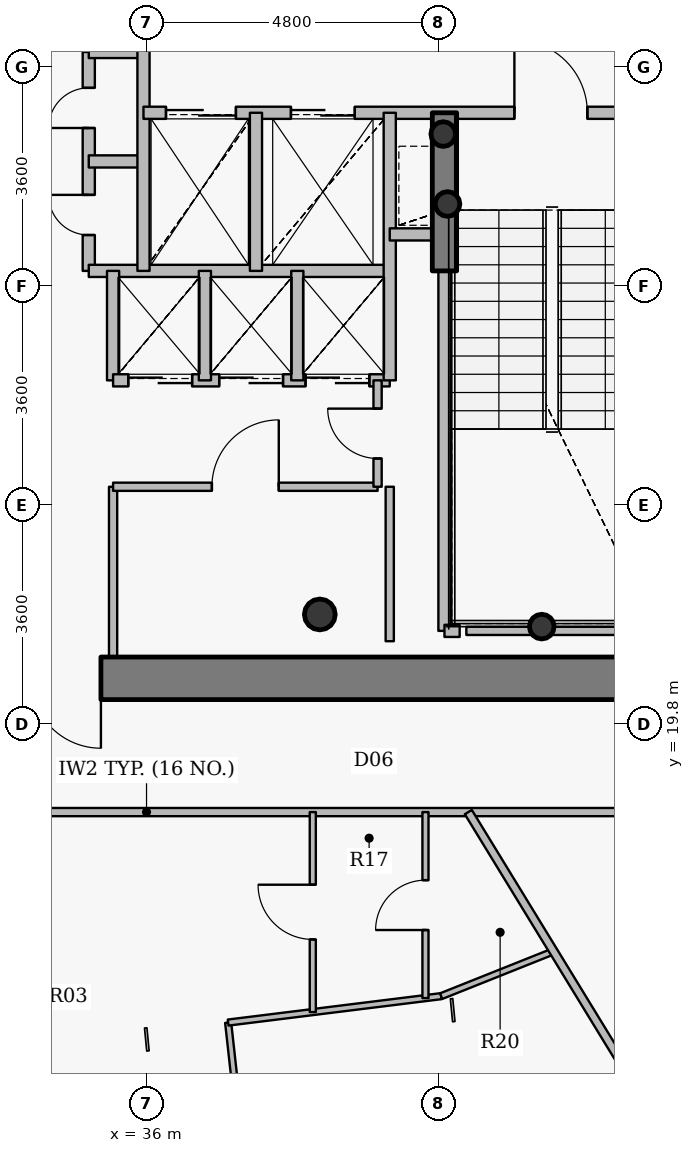
"""IFC4 building model, lengths in metres.
Left out: names, types, materials, properties, quantities, classifications, styles, units other than length and angle.
Written with IfcOpenShell. Run it as: python <this file> out.ifc"""

import sys

from ifc_helpers import new_model, si_unit, direction, frame, frame_2d, origin, origin_2d, place, context, subcontext, project, spatial, rectangle, hollow_circle, extrude, source, transform, mapped, element, fill, save


model = new_model("IFC4")
c1 = context("Model", 3, precision=1e-05, world=origin(), true_north=direction((0.0, 1.0)))
c2 = subcontext(c1, "Body", "Model", "MODEL_VIEW")
j1 = project(units=[si_unit("LENGTHUNIT", "METRE"), si_unit("PLANEANGLEUNIT", "RADIAN")], contexts=[c1])
p1 = place(None, origin())
s1 = spatial("IfcSite", under=j1, at=p1, CompositionType="ELEMENT")
p2 = place(p1, origin())
s2 = spatial("IfcBuilding", under=s1, at=p2, CompositionType="ELEMENT")
p3 = place(p2, frame((0.0, 0.0, 291.75)))
s3 = spatial("IfcBuildingStorey", under=s2, at=p3, CompositionType="ELEMENT", Elevation=291.75)
p4 = place(p3, frame((38.85, 21.6, 0.0), z_axis=(0.0, 0.0, 1.0), x_axis=(1.0, 0.0, 0.0)))
e1 = element("IfcColumn", 1, at=p4, inside=s3, PredefinedType="COLUMN", context=c2, shape_type="SweptSolid", body=[
    extrude(hollow_circle(Radius=0.254, WallThickness=0.02, at=origin_2d()), origin(), (0.0, 0.0, 1.0), 3.75),
])
for number, where, z_axis, x_axis in (
    (2, (42.5, 21.4, 0.0), (0.0, 0.0, 1.0), (1.0, 0.0, 0.0)),
    (3, (40.95, 28.35, 0.0), (0.0, 0.0, 1.0), (1.0, 0.0, 0.0)),
    (4, (40.88, 29.5, 0.0), (0.0, 0.0, 1.0), (1.0, 0.0, 0.0)),
):
    element("IfcColumn", number, at=place(p3, frame(where, z_axis=z_axis, x_axis=x_axis)), inside=s3, PredefinedType="COLUMN", context=c2, shape_type="SweptSolid", body=[
        extrude(hollow_circle(Radius=0.203, WallThickness=0.016, at=origin_2d()), origin(), (0.0, 0.0, 1.0), 3.75),
    ])
p5 = place(p3, frame((44.35, 20.55, 0.0), z_axis=(0.0, 0.0, 1.0), x_axis=(-1.0, 0.0, 0.0)))
e5 = element("IfcWall", 5, at=p5, inside=s3, PredefinedType="SHEAR", context=c2, shape_type="SweptSolid", body=[
    extrude(rectangle(XDim=16.7, YDim=0.7, at=frame_2d((8.35, 0.0))), origin(), (0.0, 0.0, 1.0), 3.05),
])
p6 = place(p5, frame((12.925, 0.0, 0.0)))
e6 = element("IfcOpeningElement", 6, at=p6, cuts=e5, PredefinedType="OPENING", context=c2, shape_type="SweptSolid", body=[
    extrude(rectangle(XDim=1.15, YDim=2.15, at=origin_2d()), frame((0.575, 0.36, 1.075), z_axis=(0.0, -1.0, 0.0), x_axis=(1.0, 0.0, 0.0)), (0.0, 0.0, 1.0), 0.72),
])
p7 = place(p5, frame((9.1, 0.0, 0.0)))
e7 = element("IfcOpeningElement", 7, at=p7, cuts=e5, PredefinedType="OPENING", context=c2, shape_type="SweptSolid", body=[
    extrude(rectangle(XDim=1.15, YDim=2.15, at=origin_2d()), frame((0.575, 0.36, 1.075), z_axis=(0.0, -1.0, 0.0), x_axis=(1.0, 0.0, 0.0)), (0.0, 0.0, 1.0), 0.72),
])
p8 = place(p3, frame((40.9, 27.25, 0.0), z_axis=(0.0, 0.0, 1.0), x_axis=(0.0, 1.0, 0.0)))
e8 = element("IfcWall", 8, at=p8, inside=s3, PredefinedType="SHEAR", context=c2, shape_type="SweptSolid", body=[
    extrude(rectangle(XDim=2.6, YDim=0.4, at=frame_2d((1.3, 0.0))), origin(), (0.0, 0.0, 1.0), 3.1),
])
p9 = place(p3, frame((24.95, 18.35, 0.0), z_axis=(0.0, 0.0, 1.0), x_axis=(1.0, 0.0, 0.0)))
e9 = element("IfcWall", 9, at=p9, inside=s3, PredefinedType="PARTITIONING", context=c2, shape_type="SweptSolid", body=[
    extrude(rectangle(XDim=22.1, YDim=0.135, at=frame_2d((11.05, 0.0))), origin(), (0.0, 0.0, 1.0), 3.035),
])
p10 = place(p9, frame((6.49, 0.0, 0.0)))
e10 = element("IfcOpeningElement", 10, at=p10, cuts=e9, PredefinedType="OPENING", context=c2, shape_type="SweptSolid", body=[
    extrude(rectangle(XDim=1.0, YDim=2.15, at=origin_2d()), frame((0.5, 0.078, 1.075), z_axis=(0.0, -1.0, 0.0), x_axis=(1.0, 0.0, 0.0)), (0.0, 0.0, 1.0), 0.155),
])
p11 = place(p3, frame((35.05, 27.25, 0.0), z_axis=(0.0, 0.0, 1.0), x_axis=(0.0, 1.0, 0.0)))
e11 = element("IfcWall", 11, at=p11, inside=s3, PredefinedType="PARTITIONING", context=c2, shape_type="SweptSolid", body=[
    extrude(rectangle(XDim=3.6, YDim=0.2, at=frame_2d((1.8, 0.0))), origin(), (0.0, 0.0, 1.0), 3.5),
])
p12 = place(p11, frame((0.59, 0.0, 0.0)))
e12 = element("IfcOpeningElement", 12, at=p12, cuts=e11, PredefinedType="OPENING", context=c2, shape_type="SweptSolid", body=[
    extrude(rectangle(XDim=0.66, YDim=2.05, at=origin_2d()), frame((0.33, 0.11, 1.025), z_axis=(0.0, -1.0, 0.0), x_axis=(1.0, 0.0, 0.0)), (0.0, 0.0, 1.0), 0.22),
])
p13 = place(p11, frame((2.35, 0.0, 0.0)))
e13 = element("IfcOpeningElement", 13, at=p13, cuts=e11, PredefinedType="OPENING", context=c2, shape_type="SweptSolid", body=[
    extrude(rectangle(XDim=0.66, YDim=2.05, at=origin_2d()), frame((0.33, 0.11, 1.025), z_axis=(0.0, -1.0, 0.0), x_axis=(1.0, 0.0, 0.0)), (0.0, 0.0, 1.0), 0.22),
])
p14 = place(p3, frame((35.05, 27.25, 0.0), z_axis=(0.0, 0.0, 1.0), x_axis=(1.0, 0.0, 0.0)))
e14 = element("IfcWall", 14, at=p14, inside=s3, PredefinedType="PARTITIONING", context=c2, shape_type="SweptSolid", body=[
    extrude(rectangle(XDim=4.95, YDim=0.2, at=frame_2d((2.475, 0.0))), origin(), (0.0, 0.0, 1.0), 3.085),
])
for number, where, z_axis, x_axis in (
    (15, (35.05, 29.05, 0.0), (0.0, 0.0, 1.0), (1.0, 0.0, 0.0)),
    (16, (35.05, 30.85, 0.0), (0.0, 0.0, 1.0), (1.0, 0.0, 0.0)),
):
    element("IfcWall", number, at=place(p3, frame(where, z_axis=z_axis, x_axis=x_axis)), inside=s3, PredefinedType="PARTITIONING", context=c2, shape_type="SweptSolid", body=[
        extrude(rectangle(XDim=0.9, YDim=0.2, at=frame_2d((0.45, 0.0))), origin(), (0.0, 0.0, 1.0), 3.5),
    ])
p15 = place(p3, frame((35.45, 20.9, 0.0), z_axis=(0.0, 0.0, 1.0), x_axis=(0.0, 1.0, 0.0)))
e17 = element("IfcWall", 17, at=p15, inside=s3, PredefinedType="PARTITIONING", context=c2, shape_type="SweptSolid", body=[
    extrude(rectangle(XDim=2.8, YDim=0.135, at=frame_2d((1.4, 0.0))), origin(), (0.0, 0.0, 1.0), 3.085),
])
p16 = place(p3, frame((35.45, 23.7, 0.0), z_axis=(0.0, 0.0, 1.0), x_axis=(1.0, 0.0, 0.0)))
e18 = element("IfcWall", 18, at=p16, inside=s3, PredefinedType="PARTITIONING", context=c2, shape_type="SweptSolid", body=[
    extrude(rectangle(XDim=4.35, YDim=0.135, at=frame_2d((2.175, 0.0))), origin(), (0.0, 0.0, 1.0), 3.085),
])
p17 = place(p16, frame((1.625, 0.0, 0.0)))
e19 = element("IfcOpeningElement", 19, at=p17, cuts=e18, PredefinedType="OPENING", context=c2, shape_type="SweptSolid", body=[
    extrude(rectangle(XDim=1.1, YDim=2.15, at=origin_2d()), frame((0.55, 0.078, 1.075), z_axis=(0.0, -1.0, 0.0), x_axis=(1.0, 0.0, 0.0)), (0.0, 0.0, 1.0), 0.155),
])
p18 = place(p3, frame((35.45, 25.45, 0.0), z_axis=(0.0, 0.0, 1.0), x_axis=(0.0, 1.0, 0.0)))
e20 = element("IfcWall", 20, at=p18, inside=s3, PredefinedType="PARTITIONING", context=c2, shape_type="SweptSolid", body=[
    extrude(rectangle(XDim=1.8, YDim=0.2, at=frame_2d((0.9, 0.0))), origin(), (0.0, 0.0, 1.0), 3.5),
])
p19 = place(p3, frame((35.45, 25.45, 0.0), z_axis=(0.0, 0.0, 1.0), x_axis=(1.0, 0.0, 0.0)))
e21 = element("IfcWall", 21, at=p19, inside=s3, PredefinedType="PARTITIONING", context=c2, shape_type="SweptSolid", body=[
    extrude(rectangle(XDim=4.55, YDim=0.2, at=frame_2d((2.275, 0.0))), origin(), (0.0, 0.0, 1.0), 3.085),
])
p20 = place(p19, frame((0.25, 0.0, 0.0)))
e22 = element("IfcOpeningElement", 22, at=p20, cuts=e21, PredefinedType="OPENING", context=c2, shape_type="SweptSolid", body=[
    extrude(rectangle(XDim=1.05, YDim=2.15, at=origin_2d()), frame((0.525, 0.11, 1.075), z_axis=(0.0, -1.0, 0.0), x_axis=(1.0, 0.0, 0.0)), (0.0, 0.0, 1.0), 0.22),
])
p21 = place(p19, frame((1.745, 0.0, 0.0)))
e23 = element("IfcOpeningElement", 23, at=p21, cuts=e21, PredefinedType="OPENING", context=c2, shape_type="SweptSolid", body=[
    extrude(rectangle(XDim=1.05, YDim=2.15, at=origin_2d()), frame((0.525, 0.11, 1.075), z_axis=(0.0, -1.0, 0.0), x_axis=(1.0, 0.0, 0.0)), (0.0, 0.0, 1.0), 0.22),
])
p22 = place(p19, frame((3.165, 0.0, 0.0)))
e24 = element("IfcOpeningElement", 24, at=p22, cuts=e21, PredefinedType="OPENING", context=c2, shape_type="SweptSolid", body=[
    extrude(rectangle(XDim=1.05, YDim=2.15, at=origin_2d()), frame((0.525, 0.11, 1.075), z_axis=(0.0, -1.0, 0.0), x_axis=(1.0, 0.0, 0.0)), (0.0, 0.0, 1.0), 0.22),
])
p23 = place(p3, frame((35.95, 27.25, 0.0), z_axis=(0.0, 0.0, 1.0), x_axis=(0.0, 1.0, 0.0)))
e25 = element("IfcWall", 25, at=p23, inside=s3, PredefinedType="PARTITIONING", context=c2, shape_type="SweptSolid", body=[
    extrude(rectangle(XDim=3.8, YDim=0.2, at=frame_2d((1.9, 0.0))), origin(), (0.0, 0.0, 1.0), 3.5),
])
p24 = place(p3, frame((35.95, 29.85, 0.0), z_axis=(0.0, 0.0, 1.0), x_axis=(1.0, 0.0, 0.0)))
e26 = element("IfcWall", 26, at=p24, inside=s3, PredefinedType="PARTITIONING", context=c2, shape_type="SweptSolid", body=[
    extrude(rectangle(XDim=8.49, YDim=0.2, at=frame_2d((4.245, 0.0))), origin(), (0.0, 0.0, 1.0), 3.085),
])
p25 = place(p24, frame((6.1, 0.0, 0.0)))
e27 = element("IfcOpeningElement", 27, at=p25, cuts=e26, PredefinedType="OPENING", context=c2, shape_type="SweptSolid", body=[
    extrude(rectangle(XDim=1.2, YDim=2.15, at=origin_2d()), frame((0.6, 0.11, 1.075), z_axis=(0.0, -1.0, 0.0), x_axis=(1.0, 0.0, 0.0)), (0.0, 0.0, 1.0), 0.22),
])
p26 = place(p24, frame((0.37, 0.0, 0.0)))
e28 = element("IfcOpeningElement", 28, at=p26, cuts=e26, PredefinedType="OPENING", context=c2, shape_type="SweptSolid", body=[
    extrude(rectangle(XDim=1.15, YDim=2.15, at=origin_2d()), frame((0.575, 0.11, 1.075), z_axis=(0.0, -1.0, 0.0), x_axis=(1.0, 0.0, 0.0)), (0.0, 0.0, 1.0), 0.22),
])
p27 = place(p24, frame((2.425, 0.0, 0.0)))
e29 = element("IfcOpeningElement", 29, at=p27, cuts=e26, PredefinedType="OPENING", context=c2, shape_type="SweptSolid", body=[
    extrude(rectangle(XDim=1.05, YDim=2.15, at=origin_2d()), frame((0.525, 0.11, 1.075), z_axis=(0.0, -1.0, 0.0), x_axis=(1.0, 0.0, 0.0)), (0.0, 0.0, 1.0), 0.22),
])
p28 = place(p3, frame((36.96, 25.45, 0.0), z_axis=(0.0, 0.0, 1.0), x_axis=(0.0, 1.0, 0.0)))
e30 = element("IfcWall", 30, at=p28, inside=s3, PredefinedType="PARTITIONING", context=c2, shape_type="SweptSolid", body=[
    extrude(rectangle(XDim=1.8, YDim=0.2, at=frame_2d((0.9, 0.0))), origin(), (0.0, 0.0, 1.0), 3.5),
])
p29 = place(p3, frame((37.342, 14.888, 0.0), z_axis=(0.0, 0.0, 1.0), x_axis=(0.110149295127, -0.993915053102, 0.0)))
e31 = element("IfcWall", 31, at=p29, inside=s3, PredefinedType="PARTITIONING", context=c2, shape_type="SweptSolid", body=[
    extrude(rectangle(XDim=5.222, YDim=0.1, at=frame_2d((2.611, 0.0))), origin(), (0.0, 0.0, 1.0), 2.985),
])
p30 = place(p29, frame((2.161, 0.0, 0.0)))
e32 = element("IfcOpeningElement", 32, at=p30, cuts=e31, PredefinedType="OPENING", context=c2, shape_type="SweptSolid", body=[
    extrude(rectangle(XDim=0.9, YDim=2.1, at=origin_2d()), frame((0.45, 0.06, 1.05), z_axis=(0.0, -1.0, 0.0), x_axis=(1.0, 0.0, 0.0)), (0.0, 0.0, 1.0), 0.12),
])
p31 = place(p3, frame((37.342, 14.888, 0.0), z_axis=(0.0, 0.0, 1.0), x_axis=(0.992393420873, 0.123106856865, 0.0)))
e33 = element("IfcWall", 33, at=p31, inside=s3, PredefinedType="PARTITIONING", context=c2, shape_type="SweptSolid", body=[
    extrude(rectangle(XDim=3.53, YDim=0.1, at=frame_2d((1.765, 0.0))), origin(), (0.0, 0.0, 1.0), 3.035),
])
p32 = place(p3, frame((37.8, 27.25, 0.0), z_axis=(0.0, 0.0, 1.0), x_axis=(0.0, 1.0, 0.0)))
e34 = element("IfcWall", 34, at=p32, inside=s3, PredefinedType="PARTITIONING", context=c2, shape_type="SweptSolid", body=[
    extrude(rectangle(XDim=2.6, YDim=0.2, at=frame_2d((1.3, 0.0))), origin(), (0.0, 0.0, 1.0), 3.5),
])
p33 = place(p3, frame((38.48, 25.45, 0.0), z_axis=(0.0, 0.0, 1.0), x_axis=(0.0, 1.0, 0.0)))
e35 = element("IfcWall", 35, at=p33, inside=s3, PredefinedType="PARTITIONING", context=c2, shape_type="SweptSolid", body=[
    extrude(rectangle(XDim=1.8, YDim=0.2, at=frame_2d((0.9, 0.0))), origin(), (0.0, 0.0, 1.0), 3.5),
])
p34 = place(p3, frame((38.734, 15.061, 0.0), z_axis=(0.0, 0.0, 1.0), x_axis=(0.0, 1.0, 0.0)))
e36 = element("IfcWall", 36, at=p34, inside=s3, PredefinedType="PARTITIONING", context=c2, shape_type="SweptSolid", body=[
    extrude(rectangle(XDim=3.289, YDim=0.1, at=frame_2d((1.645, 0.0))), origin(), (0.0, 0.0, 1.0), 3.5),
])
p35 = place(p34, frame((1.194, 0.0, 0.0)))
e37 = element("IfcOpeningElement", 37, at=p35, cuts=e36, PredefinedType="OPENING", context=c2, shape_type="SweptSolid", body=[
    extrude(rectangle(XDim=0.9, YDim=2.1, at=origin_2d()), frame((0.45, 0.06, 1.05), z_axis=(0.0, -1.0, 0.0), x_axis=(1.0, 0.0, 0.0)), (0.0, 0.0, 1.0), 0.12),
])
p36 = place(p3, frame((39.8, 23.7, 0.0), z_axis=(0.0, 0.0, 1.0), x_axis=(0.0, 1.0, 0.0)))
e38 = element("IfcWall", 38, at=p36, inside=s3, PredefinedType="PARTITIONING", context=c2, shape_type="SweptSolid", body=[
    extrude(rectangle(XDim=1.75, YDim=0.135, at=frame_2d((0.875, 0.0))), origin(), (0.0, 0.0, 1.0), 3.5),
])
p37 = place(p36, frame((0.465, 0.0, 0.0)))
e39 = element("IfcOpeningElement", 39, at=p37, cuts=e38, PredefinedType="OPENING", context=c2, shape_type="SweptSolid", body=[
    extrude(rectangle(XDim=0.82, YDim=2.1, at=origin_2d()), frame((0.41, 0.078, 1.05), z_axis=(0.0, -1.0, 0.0), x_axis=(1.0, 0.0, 0.0)), (0.0, 0.0, 1.0), 0.155),
])
p38 = place(p3, frame((40.0, 25.45, 0.0), z_axis=(0.0, 0.0, 1.0), x_axis=(0.0, 1.0, 0.0)))
e40 = element("IfcWall", 40, at=p38, inside=s3, PredefinedType="PARTITIONING", context=c2, shape_type="SweptSolid", body=[
    extrude(rectangle(XDim=4.4, YDim=0.2, at=frame_2d((2.2, 0.0))), origin(), (0.0, 0.0, 1.0), 3.5),
])
p39 = place(p3, frame((40.0, 27.85, 0.0), z_axis=(0.0, 0.0, 1.0), x_axis=(1.0, 0.0, 0.0)))
e41 = element("IfcWall", 41, at=p39, inside=s3, PredefinedType="PARTITIONING", context=c2, shape_type="SweptSolid", body=[
    extrude(rectangle(XDim=0.9, YDim=0.2, at=frame_2d((0.45, 0.0))), origin(), (0.0, 0.0, 1.0), 3.5),
])
p40 = place(p3, frame((40.587, 15.291, 0.0), z_axis=(0.0, 0.0, 1.0), x_axis=(0.0, 1.0, 0.0)))
e42 = element("IfcWall", 42, at=p40, inside=s3, PredefinedType="PARTITIONING", context=c2, shape_type="SweptSolid", body=[
    extrude(rectangle(XDim=3.059, YDim=0.1, at=frame_2d((1.53, 0.0))), origin(), (0.0, 0.0, 1.0), 3.035),
])
p41 = place(p40, frame((1.119, 0.0, 0.0)))
e43 = element("IfcOpeningElement", 43, at=p41, cuts=e42, PredefinedType="OPENING", context=c2, shape_type="SweptSolid", body=[
    extrude(rectangle(XDim=0.82, YDim=2.1, at=origin_2d()), frame((0.41, 0.06, 1.05), z_axis=(0.0, -1.0, 0.0), x_axis=(1.0, 0.0, 0.0)), (0.0, 0.0, 1.0), 0.12),
])
p42 = place(p3, frame((40.845, 15.323, 0.0), z_axis=(0.0, 0.0, 1.0), x_axis=(0.928797929692, 0.370586569913, 0.0)))
e44 = element("IfcWall", 44, at=p42, inside=s3, PredefinedType="PARTITIONING", context=c2, shape_type="SweptSolid", body=[
    extrude(rectangle(XDim=1.99, YDim=0.1, at=frame_2d((0.995, 0.0))), origin(), (0.0, 0.0, 1.0), 3.035),
])
p43 = place(p3, frame((40.9, 21.33, 0.0), z_axis=(0.0, 0.0, 1.0), x_axis=(0.0, 1.0, 0.0)))
e45 = element("IfcWall", 45, at=p43, inside=s3, PredefinedType="PARTITIONING", context=c2, shape_type="SweptSolid", body=[
    extrude(rectangle(XDim=5.91, YDim=0.2, at=frame_2d((2.955, 0.0))), origin(), (0.0, 0.0, 1.0), 3.035),
])
p44 = place(p3, frame((40.9, 21.33, 0.0), z_axis=(0.0, 0.0, 1.0), x_axis=(1.0, 0.0, 0.0)))
e46 = element("IfcWall", 46, at=p44, inside=s3, PredefinedType="PARTITIONING", context=c2, shape_type="SweptSolid", body=[
    extrude(rectangle(XDim=0.25, YDim=0.2, at=frame_2d((0.125, 0.0))), origin(), (0.0, 0.0, 1.0), 3.035),
])
p45 = place(p3, frame((41.292, 18.35, 0.0), z_axis=(0.0, 0.0, 1.0), x_axis=(0.521891606098, -0.853011812043, 0.0)))
e47 = element("IfcWall", 47, at=p45, inside=s3, PredefinedType="PARTITIONING", context=c2, shape_type="SweptSolid", body=[
    extrude(rectangle(XDim=8.25, YDim=0.135, at=frame_2d((4.125, 0.0))), origin(), (0.0, 0.0, 1.0), 2.985),
])
p46 = place(p3, frame((44.24, 21.33, 0.0), z_axis=(0.0, 0.0, 1.0), x_axis=(-1.0, 0.0, 0.0)))
e48 = element("IfcWall", 48, at=p46, inside=s3, PredefinedType="PARTITIONING", context=c2, shape_type="SweptSolid", body=[
    extrude(rectangle(XDim=2.98, YDim=0.135, at=frame_2d((1.49, 0.0))), origin(), (0.0, 0.0, 1.0), 3.035),
])
p47 = place(p3, frame((40.0, 23.7, 0.0), z_axis=(0.0, 0.0, 1.0), x_axis=(0.0, -1.0, 0.0)))
e49 = element("IfcWall", 49, at=p47, inside=s3, PredefinedType="PARTITIONING", context=c2, shape_type="SweptSolid", body=[
    extrude(rectangle(XDim=2.54, YDim=0.135, at=frame_2d((1.27, 0.0))), origin(), (0.0, 0.0, 1.0), 3.035),
])
m1 = source(origin(), c2, "Body", "SweptSolid", [
    extrude(rectangle(XDim=1.15, YDim=2.15, at=origin_2d()), frame((0.575, 0.025, 1.075), z_axis=(0.0, -1.0, 0.0), x_axis=(1.0, 0.0, 0.0)), (0.0, 0.0, 1.0), 0.05),
])
p48 = place(p7, origin())
e50 = element("IfcDoor", 50, at=p48, inside=s3, OperationType="SINGLE_SWING_LEFT", PredefinedType="DOOR", context=c2, shape_type="MappedRepresentation", body=[
    mapped(m1, transform((0.0, 0.0, 0.0), x_axis=(1.0, 0.0, 0.0), y_axis=(0.0, 1.0, 0.0), z_axis=(0.0, 0.0, 1.0), scale=1.0)),
])
fill(e7, e50)
m2 = source(origin(), c2, "Body", "SweptSolid", [
    extrude(rectangle(XDim=1.2, YDim=2.15, at=origin_2d()), frame((0.6, 0.025, 1.075), z_axis=(0.0, -1.0, 0.0), x_axis=(1.0, 0.0, 0.0)), (0.0, 0.0, 1.0), 0.05),
])
p49 = place(p25, origin())
e51 = element("IfcDoor", 51, at=p49, inside=s3, OperationType="SINGLE_SWING_LEFT", PredefinedType="DOOR", context=c2, shape_type="MappedRepresentation", body=[
    mapped(m2, transform((0.0, 0.0, 0.0), x_axis=(1.0, 0.0, 0.0), y_axis=(0.0, 1.0, 0.0), z_axis=(0.0, 0.0, 1.0), scale=1.0)),
])
fill(e27, e51)
m3 = source(origin(), c2, "Body", "SweptSolid", [
    extrude(rectangle(XDim=1.15, YDim=2.15, at=origin_2d()), frame((0.575, 0.025, 1.075), z_axis=(0.0, -1.0, 0.0), x_axis=(1.0, 0.0, 0.0)), (0.0, 0.0, 1.0), 0.05),
])
p50 = place(p26, origin())
e52 = element("IfcDoor", 52, at=p50, inside=s3, OperationType="DOUBLE_DOOR_SLIDING", PredefinedType="USERDEFINED", context=c2, shape_type="MappedRepresentation", body=[
    mapped(m3, transform((0.0, 0.0, 0.0), x_axis=(1.0, 0.0, 0.0), y_axis=(0.0, 1.0, 0.0), z_axis=(0.0, 0.0, 1.0), scale=1.0)),
])
fill(e28, e52)
m4 = source(origin(), c2, "Body", "SweptSolid", [
    extrude(rectangle(XDim=1.05, YDim=2.15, at=origin_2d()), frame((0.525, 0.025, 1.075), z_axis=(0.0, -1.0, 0.0), x_axis=(1.0, 0.0, 0.0)), (0.0, 0.0, 1.0), 0.05),
])
p51 = place(p27, origin())
e53 = element("IfcDoor", 53, at=p51, inside=s3, OperationType="DOUBLE_DOOR_SLIDING", PredefinedType="USERDEFINED", context=c2, shape_type="MappedRepresentation", body=[
    mapped(m4, transform((0.0, 0.0, 0.0), x_axis=(1.0, 0.0, 0.0), y_axis=(0.0, 1.0, 0.0), z_axis=(0.0, 0.0, 1.0), scale=1.0)),
])
fill(e29, e53)
p52 = place(p20, origin())
e54 = element("IfcDoor", 54, at=p52, inside=s3, OperationType="DOUBLE_DOOR_SLIDING", PredefinedType="USERDEFINED", context=c2, shape_type="MappedRepresentation", body=[
    mapped(m4, transform((0.0, 0.0, 0.0), x_axis=(1.0, 0.0, 0.0), y_axis=(0.0, 1.0, 0.0), z_axis=(0.0, 0.0, 1.0), scale=1.0)),
])
fill(e22, e54)
p53 = place(p21, origin())
e55 = element("IfcDoor", 55, at=p53, inside=s3, OperationType="DOUBLE_DOOR_SLIDING", PredefinedType="USERDEFINED", context=c2, shape_type="MappedRepresentation", body=[
    mapped(m4, transform((0.0, 0.0, 0.0), x_axis=(1.0, 0.0, 0.0), y_axis=(0.0, 1.0, 0.0), z_axis=(0.0, 0.0, 1.0), scale=1.0)),
])
fill(e23, e55)
p54 = place(p22, origin())
e56 = element("IfcDoor", 56, at=p54, inside=s3, OperationType="DOUBLE_DOOR_SLIDING", PredefinedType="USERDEFINED", context=c2, shape_type="MappedRepresentation", body=[
    mapped(m4, transform((0.0, 0.0, 0.0), x_axis=(1.0, 0.0, 0.0), y_axis=(0.0, 1.0, 0.0), z_axis=(0.0, 0.0, 1.0), scale=1.0)),
])
fill(e24, e56)
m5 = source(origin(), c2, "Body", "SweptSolid", [
    extrude(rectangle(XDim=0.9, YDim=2.1, at=origin_2d()), frame((0.45, 0.025, 1.05), z_axis=(0.0, -1.0, 0.0), x_axis=(1.0, 0.0, 0.0)), (0.0, 0.0, 1.0), 0.05),
])
p55 = place(p35, origin())
e57 = element("IfcDoor", 57, at=p55, inside=s3, OperationType="SINGLE_SWING_RIGHT", PredefinedType="DOOR", context=c2, shape_type="MappedRepresentation", body=[
    mapped(m5, transform((0.0, 0.0, 0.0), x_axis=(1.0, 0.0, 0.0), y_axis=(0.0, 1.0, 0.0), z_axis=(0.0, 0.0, 1.0), scale=1.0)),
])
fill(e37, e57)
m6 = source(origin(), c2, "Body", "SweptSolid", [
    extrude(rectangle(XDim=0.82, YDim=2.1, at=origin_2d()), frame((0.41, 0.025, 1.05), z_axis=(0.0, -1.0, 0.0), x_axis=(1.0, 0.0, 0.0)), (0.0, 0.0, 1.0), 0.05),
])
p56 = place(p41, origin())
e58 = element("IfcDoor", 58, at=p56, inside=s3, OperationType="SINGLE_SWING_LEFT", PredefinedType="DOOR", context=c2, shape_type="MappedRepresentation", body=[
    mapped(m6, transform((0.0, 0.0, 0.0), x_axis=(1.0, 0.0, 0.0), y_axis=(0.0, 1.0, 0.0), z_axis=(0.0, 0.0, 1.0), scale=1.0)),
])
fill(e43, e58)
m7 = source(origin(), c2, "Body", "SweptSolid", [
    extrude(rectangle(XDim=0.66, YDim=2.05, at=origin_2d()), frame((0.33, 0.025, 1.025), z_axis=(0.0, -1.0, 0.0), x_axis=(1.0, 0.0, 0.0)), (0.0, 0.0, 1.0), 0.05),
])
p57 = place(p12, origin())
e59 = element("IfcDoor", 59, at=p57, inside=s3, OperationType="SINGLE_SWING_RIGHT", PredefinedType="USERDEFINED", context=c2, shape_type="MappedRepresentation", body=[
    mapped(m7, transform((0.0, 0.0, 0.0), x_axis=(1.0, 0.0, 0.0), y_axis=(0.0, 1.0, 0.0), z_axis=(0.0, 0.0, 1.0), scale=1.0)),
])
fill(e12, e59)
p58 = place(p13, origin())
e60 = element("IfcDoor", 60, at=p58, inside=s3, OperationType="SINGLE_SWING_LEFT", PredefinedType="USERDEFINED", context=c2, shape_type="MappedRepresentation", body=[
    mapped(m7, transform((0.0, 0.0, 0.0), x_axis=(1.0, 0.0, 0.0), y_axis=(0.0, 1.0, 0.0), z_axis=(0.0, 0.0, 1.0), scale=1.0)),
])
fill(e13, e60)
m8 = source(origin(), c2, "Body", "SweptSolid", [
    extrude(rectangle(XDim=1.1, YDim=2.15, at=origin_2d()), frame((0.55, 0.025, 1.075), z_axis=(0.0, -1.0, 0.0), x_axis=(1.0, 0.0, 0.0)), (0.0, 0.0, 1.0), 0.05),
])
p59 = place(p17, origin())
e61 = element("IfcDoor", 61, at=p59, inside=s3, OperationType="SINGLE_SWING_RIGHT", PredefinedType="DOOR", context=c2, shape_type="MappedRepresentation", body=[
    mapped(m8, transform((0.0, 0.0, 0.0), x_axis=(1.0, 0.0, 0.0), y_axis=(0.0, 1.0, 0.0), z_axis=(0.0, 0.0, 1.0), scale=1.0)),
])
fill(e19, e61)
p60 = place(p37, origin())
e62 = element("IfcDoor", 62, at=p60, inside=s3, OperationType="SINGLE_SWING_RIGHT", PredefinedType="DOOR", context=c2, shape_type="MappedRepresentation", body=[
    mapped(m6, transform((0.0, 0.0, 0.0), x_axis=(1.0, 0.0, 0.0), y_axis=(0.0, 1.0, 0.0), z_axis=(0.0, 0.0, 1.0), scale=1.0)),
])
fill(e39, e62)
save(model, sys.argv[1])
